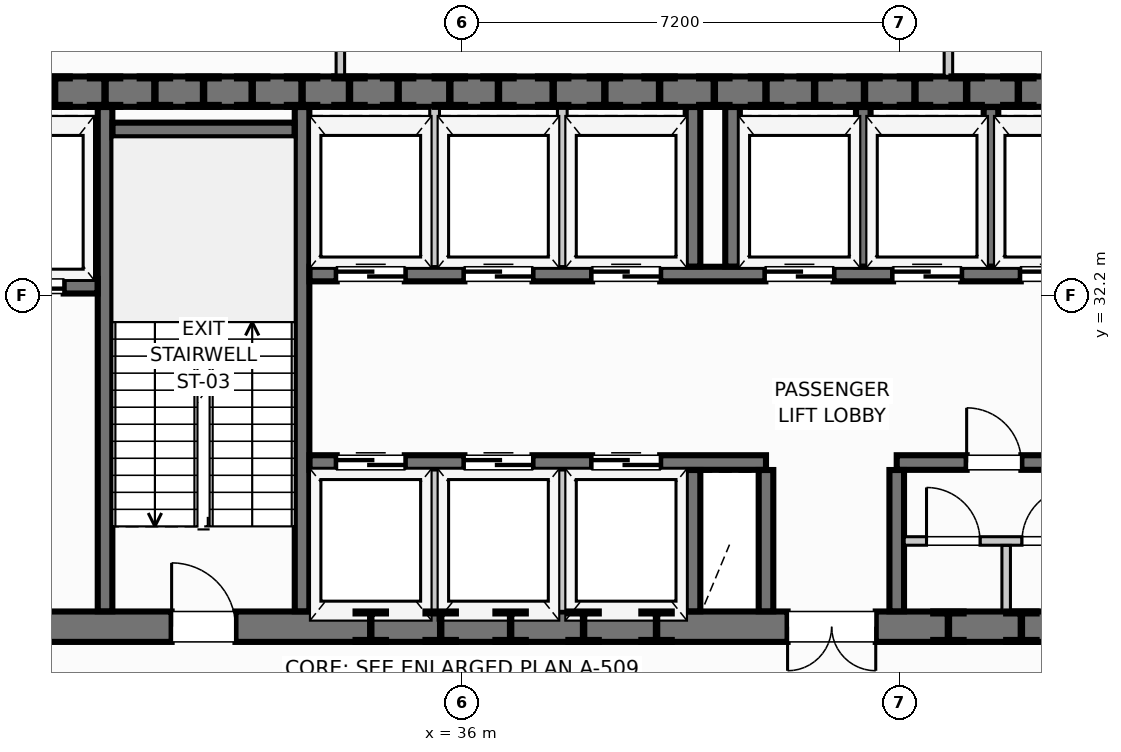
"""IFC4 building model, lengths in metres.
Left out: names, types, materials, properties, quantities, classifications, styles, units other than length and angle.
Written with IfcOpenShell. Run it as: python <this file> out.ifc"""

import sys

from ifc_helpers import new_model, si_unit, direction, frame, frame_2d, origin, origin_2d, place, context, subcontext, project, spatial, rectangle, i_section, extrude, element, fill, save


model = new_model("IFC4")
c1 = context("Model", 3, precision=1e-05, world=origin(), true_north=direction((0.0, 1.0)))
c2 = subcontext(c1, "Body", "Model", "MODEL_VIEW")
j1 = project(units=[si_unit("LENGTHUNIT", "METRE"), si_unit("PLANEANGLEUNIT", "RADIAN")], contexts=[c1])
p1 = place(None, origin())
s1 = spatial("IfcSite", under=j1, at=p1, CompositionType="ELEMENT")
p2 = place(p1, origin())
s2 = spatial("IfcBuilding", under=s1, at=p2, CompositionType="ELEMENT")
p3 = place(p2, frame((0.0, 0.0, 105.95)))
s3 = spatial("IfcBuildingStorey", under=s2, at=p3, CompositionType="ELEMENT", Elevation=105.95)
for number, where, z_axis, x_axis in (
    (1, (30.13, 35.55, 0.0), (0.0, 0.0, 1.0), (1.0, 0.0, 0.0)),
    (2, (31.75, 35.55, 0.0), (0.0, 0.0, 1.0), (1.0, 0.0, 0.0)),
    (3, (33.37, 35.55, 0.0), (0.0, 0.0, 1.0), (1.0, 0.0, 0.0)),
    (4, (34.95, 35.55, 0.0), (0.0, 0.0, 1.0), (1.0, 0.0, 0.0)),
    (5, (36.6, 35.55, 0.0), (0.0, 0.0, 1.0), (1.0, 0.0, 0.0)),
    (6, (38.35, 35.55, 0.0), (0.0, 0.0, 1.0), (1.0, 0.0, 0.0)),
    (7, (40.15, 35.55, 0.0), (0.0, 0.0, 1.0), (1.0, 0.0, 0.0)),
    (8, (41.8, 35.55, 0.0), (0.0, 0.0, 1.0), (1.0, 0.0, 0.0)),
    (9, (43.45, 35.55, 0.0), (0.0, 0.0, 1.0), (1.0, 0.0, 0.0)),
    (10, (45.15, 35.55, 0.0), (0.0, 0.0, 1.0), (1.0, 0.0, 0.0)),
    (11, (34.5, 26.75, 0.0), (0.0, 0.0, 1.0), (1.0, 0.0, 0.0)),
    (12, (36.8, 26.75, 0.0), (0.0, 0.0, 1.0), (1.0, 0.0, 0.0)),
    (13, (39.2, 26.75, 0.0), (0.0, 0.0, 1.0), (1.0, 0.0, 0.0)),
    (14, (45.2, 26.75, 0.0), (0.0, 0.0, 1.0), (1.0, 0.0, 0.0)),
    (15, (32.55, 35.55, 0.0), (0.0, 0.0, 1.0), (1.0, 0.0, 0.0)),
    (16, (37.5, 35.55, 0.0), (0.0, 0.0, 1.0), (1.0, 0.0, 0.0)),
    (17, (42.62, 35.55, 0.0), (0.0, 0.0, 1.0), (1.0, 0.0, 0.0)),
    (18, (29.3, 35.55, 0.0), (0.0, 0.0, 1.0), (1.0, 0.0, 0.0)),
    (19, (30.95, 35.55, 0.0), (0.0, 0.0, 1.0), (1.0, 0.0, 0.0)),
    (20, (34.15, 35.55, 0.0), (0.0, 0.0, 1.0), (1.0, 0.0, 0.0)),
    (21, (35.8, 35.55, 0.0), (0.0, 0.0, 1.0), (1.0, 0.0, 0.0)),
    (22, (39.25, 35.55, 0.0), (0.0, 0.0, 1.0), (1.0, 0.0, 0.0)),
    (23, (41.0, 35.55, 0.0), (0.0, 0.0, 1.0), (1.0, 0.0, 0.0)),
    (24, (44.3, 35.55, 0.0), (0.0, 0.0, 1.0), (1.0, 0.0, 0.0)),
    (25, (35.65, 26.75, 0.0), (0.0, 0.0, 1.0), (1.0, 0.0, 0.0)),
    (26, (38.0, 26.75, 0.0), (0.0, 0.0, 1.0), (1.0, 0.0, 0.0)),
    (27, (44.0, 26.75, 0.0), (0.0, 0.0, 1.0), (1.0, 0.0, 0.0)),
):
    element("IfcColumn", number, at=place(p3, frame(where, z_axis=z_axis, x_axis=x_axis)), inside=s3, PredefinedType="COLUMN", context=c2, shape_type="SweptSolid", body=[
        extrude(i_section(OverallWidth=0.5, OverallDepth=0.5, WebThickness=0.022, FlangeThickness=0.032, at=origin_2d()), origin(), (0.0, 0.0, 1.0), 4.5),
    ])
p4 = place(p3, frame((21.65, 26.75, 0.0), z_axis=(0.0, 0.0, 1.0), x_axis=(1.0, 0.0, 0.0)))
e28 = element("IfcWall", 28, at=p4, inside=s3, PredefinedType="SHEAR", context=c2, shape_type="SweptSolid", body=[
    extrude(rectangle(XDim=28.7, YDim=0.5, at=frame_2d((14.35, 0.0))), origin(), (0.0, 0.0, 1.0), 4.5),
])
p5 = place(p4, frame((1.375, 0.0, 0.0)))
e29 = element("IfcOpeningElement", 29, at=p5, cuts=e28, PredefinedType="OPENING", context=c2, shape_type="SweptSolid", body=[
    extrude(rectangle(XDim=1.05, YDim=2.0, at=frame_2d((0.525, 1.0))), frame((0.0, 0.26, 0.0), z_axis=(0.0, -1.0, 0.0), x_axis=(1.0, 0.0, 0.0)), (0.0, 0.0, 1.0), 0.52),
])
p6 = place(p4, frame((5.375, 0.0, 0.0)))
e30 = element("IfcOpeningElement", 30, at=p6, cuts=e28, PredefinedType="OPENING", context=c2, shape_type="SweptSolid", body=[
    extrude(rectangle(XDim=1.05, YDim=2.0, at=frame_2d((0.525, 1.0))), frame((0.0, 0.26, 0.0), z_axis=(0.0, -1.0, 0.0), x_axis=(1.0, 0.0, 0.0)), (0.0, 0.0, 1.0), 0.52),
])
p7 = place(p4, frame((9.575, 0.0, 0.0)))
e31 = element("IfcOpeningElement", 31, at=p7, cuts=e28, PredefinedType="OPENING", context=c2, shape_type="SweptSolid", body=[
    extrude(rectangle(XDim=1.05, YDim=2.0, at=frame_2d((0.525, 1.0))), frame((0.0, 0.26, 0.0), z_axis=(0.0, -1.0, 0.0), x_axis=(1.0, 0.0, 0.0)), (0.0, 0.0, 1.0), 0.52),
])
p8 = place(p4, frame((19.705, 0.0, 0.0)))
e32 = element("IfcOpeningElement", 32, at=p8, cuts=e28, PredefinedType="OPENING", context=c2, shape_type="SweptSolid", body=[
    extrude(rectangle(XDim=1.45, YDim=2.0, at=frame_2d((0.725, 1.0))), frame((0.0, 0.26, 0.0), z_axis=(0.0, -1.0, 0.0), x_axis=(1.0, 0.0, 0.0)), (0.0, 0.0, 1.0), 0.52),
])
p9 = place(p4, frame((26.275, 0.0, 0.0)))
e33 = element("IfcOpeningElement", 33, at=p9, cuts=e28, PredefinedType="OPENING", context=c2, shape_type="SweptSolid", body=[
    extrude(rectangle(XDim=1.05, YDim=2.0, at=frame_2d((0.525, 1.0))), frame((0.0, 0.26, 0.0), z_axis=(0.0, -1.0, 0.0), x_axis=(1.0, 0.0, 0.0)), (0.0, 0.0, 1.0), 0.52),
])
p10 = place(p3, frame((50.35, 35.55, 0.0), z_axis=(0.0, 0.0, 1.0), x_axis=(-1.0, 0.0, 0.0)))
e34 = element("IfcWall", 34, at=p10, inside=s3, PredefinedType="SHEAR", context=c2, shape_type="SweptSolid", body=[
    extrude(rectangle(XDim=28.7, YDim=0.5, at=frame_2d((14.35, 0.0))), origin(), (0.0, 0.0, 1.0), 4.5),
])
for number, where, z_axis, x_axis in (
    (35, (30.13, 27.003, 0.0), (0.0, 0.0, 1.0), (0.0, 1.0, 0.0)),
    (36, (33.37, 27.003, 0.0), (0.0, 0.0, 1.0), (0.0, 1.0, 0.0)),
):
    element("IfcWall", number, at=place(p3, frame(where, z_axis=z_axis, x_axis=x_axis)), inside=s3, PredefinedType="SHEAR", context=c2, shape_type="SweptSolid", body=[
        extrude(rectangle(XDim=8.294, YDim=0.24, at=frame_2d((4.147, 0.0))), origin(), (0.0, 0.0, 1.0), 4.5),
    ])
p11 = place(p3, frame((30.253, 34.92, 0.0), z_axis=(0.0, 0.0, 1.0), x_axis=(1.0, 0.0, 0.0)))
e37 = element("IfcWall", 37, at=p11, inside=s3, PredefinedType="SHEAR", context=c2, shape_type="SweptSolid", body=[
    extrude(rectangle(XDim=2.994, YDim=0.24, at=frame_2d((1.497, 0.0))), origin(), (0.0, 0.0, 1.0), 4.5),
])
p12 = place(p3, frame((25.293, 32.35, 0.0), z_axis=(0.0, 0.0, 1.0), x_axis=(1.0, 0.0, 0.0)))
e38 = element("IfcWall", 38, at=p12, inside=s3, PredefinedType="SHEAR", context=c2, shape_type="SweptSolid", body=[
    extrude(rectangle(XDim=4.714, YDim=0.24, at=frame_2d((2.357, 0.0))), origin(), (0.0, 0.0, 1.0), 4.5),
])
p13 = place(p12, frame((0.707, 0.0, 0.0)))
e39 = element("IfcOpeningElement", 39, at=p13, cuts=e38, PredefinedType="OPENING", context=c2, shape_type="SweptSolid", body=[
    extrude(rectangle(XDim=1.1, YDim=2.0, at=frame_2d((0.55, 1.0))), frame((0.0, 0.13, 0.0), z_axis=(0.0, -1.0, 0.0), x_axis=(1.0, 0.0, 0.0)), (0.0, 0.0, 1.0), 0.26),
])
p14 = place(p12, frame((3.057, 0.0, 0.0)))
e40 = element("IfcOpeningElement", 40, at=p14, cuts=e38, PredefinedType="OPENING", context=c2, shape_type="SweptSolid", body=[
    extrude(rectangle(XDim=1.1, YDim=2.0, at=frame_2d((0.55, 1.0))), frame((0.0, 0.13, 0.0), z_axis=(0.0, -1.0, 0.0), x_axis=(1.0, 0.0, 0.0)), (0.0, 0.0, 1.0), 0.26),
])
p15 = place(p3, frame((33.493, 32.55, 0.0), z_axis=(0.0, 0.0, 1.0), x_axis=(1.0, 0.0, 0.0)))
e41 = element("IfcWall", 41, at=p15, inside=s3, PredefinedType="SHEAR", context=c2, shape_type="SweptSolid", body=[
    extrude(rectangle(XDim=13.214, YDim=0.24, at=frame_2d((6.607, 0.0))), origin(), (0.0, 0.0, 1.0), 4.5),
])
p16 = place(p15, frame((0.447, 0.0, 0.0)))
e42 = element("IfcOpeningElement", 42, at=p16, cuts=e41, PredefinedType="OPENING", context=c2, shape_type="SweptSolid", body=[
    extrude(rectangle(XDim=1.12, YDim=2.0, at=frame_2d((0.56, 1.0))), frame((0.0, 0.13, 0.0), z_axis=(0.0, -1.0, 0.0), x_axis=(1.0, 0.0, 0.0)), (0.0, 0.0, 1.0), 0.26),
])
p17 = place(p15, frame((2.547, 0.0, 0.0)))
e43 = element("IfcOpeningElement", 43, at=p17, cuts=e41, PredefinedType="OPENING", context=c2, shape_type="SweptSolid", body=[
    extrude(rectangle(XDim=1.12, YDim=2.0, at=frame_2d((0.56, 1.0))), frame((0.0, 0.13, 0.0), z_axis=(0.0, -1.0, 0.0), x_axis=(1.0, 0.0, 0.0)), (0.0, 0.0, 1.0), 0.26),
])
p18 = place(p15, frame((4.647, 0.0, 0.0)))
e44 = element("IfcOpeningElement", 44, at=p18, cuts=e41, PredefinedType="OPENING", context=c2, shape_type="SweptSolid", body=[
    extrude(rectangle(XDim=1.12, YDim=2.0, at=frame_2d((0.56, 1.0))), frame((0.0, 0.13, 0.0), z_axis=(0.0, -1.0, 0.0), x_axis=(1.0, 0.0, 0.0)), (0.0, 0.0, 1.0), 0.26),
])
p19 = place(p15, frame((7.497, 0.0, 0.0)))
e45 = element("IfcOpeningElement", 45, at=p19, cuts=e41, PredefinedType="OPENING", context=c2, shape_type="SweptSolid", body=[
    extrude(rectangle(XDim=1.12, YDim=2.0, at=frame_2d((0.56, 1.0))), frame((0.0, 0.13, 0.0), z_axis=(0.0, -1.0, 0.0), x_axis=(1.0, 0.0, 0.0)), (0.0, 0.0, 1.0), 0.26),
])
p20 = place(p15, frame((9.597, 0.0, 0.0)))
e46 = element("IfcOpeningElement", 46, at=p20, cuts=e41, PredefinedType="OPENING", context=c2, shape_type="SweptSolid", body=[
    extrude(rectangle(XDim=1.12, YDim=2.0, at=frame_2d((0.56, 1.0))), frame((0.0, 0.13, 0.0), z_axis=(0.0, -1.0, 0.0), x_axis=(1.0, 0.0, 0.0)), (0.0, 0.0, 1.0), 0.26),
])
p21 = place(p15, frame((11.697, 0.0, 0.0)))
e47 = element("IfcOpeningElement", 47, at=p21, cuts=e41, PredefinedType="OPENING", context=c2, shape_type="SweptSolid", body=[
    extrude(rectangle(XDim=1.12, YDim=2.0, at=frame_2d((0.56, 1.0))), frame((0.0, 0.13, 0.0), z_axis=(0.0, -1.0, 0.0), x_axis=(1.0, 0.0, 0.0)), (0.0, 0.0, 1.0), 0.26),
])
p22 = place(p3, frame((33.493, 29.45, 0.0), z_axis=(0.0, 0.0, 1.0), x_axis=(1.0, 0.0, 0.0)))
e48 = element("IfcWall", 48, at=p22, inside=s3, PredefinedType="SHEAR", context=c2, shape_type="SweptSolid", body=[
    extrude(rectangle(XDim=7.507, YDim=0.24, at=frame_2d((3.753, 0.0))), origin(), (0.0, 0.0, 1.0), 4.5),
])
p23 = place(p22, frame((0.447, 0.0, 0.0)))
e49 = element("IfcOpeningElement", 49, at=p23, cuts=e48, PredefinedType="OPENING", context=c2, shape_type="SweptSolid", body=[
    extrude(rectangle(XDim=1.12, YDim=2.0, at=frame_2d((0.56, 1.0))), frame((0.0, 0.13, 0.0), z_axis=(0.0, -1.0, 0.0), x_axis=(1.0, 0.0, 0.0)), (0.0, 0.0, 1.0), 0.26),
])
p24 = place(p22, frame((2.547, 0.0, 0.0)))
e50 = element("IfcOpeningElement", 50, at=p24, cuts=e48, PredefinedType="OPENING", context=c2, shape_type="SweptSolid", body=[
    extrude(rectangle(XDim=1.12, YDim=2.0, at=frame_2d((0.56, 1.0))), frame((0.0, 0.13, 0.0), z_axis=(0.0, -1.0, 0.0), x_axis=(1.0, 0.0, 0.0)), (0.0, 0.0, 1.0), 0.26),
])
p25 = place(p22, frame((4.647, 0.0, 0.0)))
e51 = element("IfcOpeningElement", 51, at=p25, cuts=e48, PredefinedType="OPENING", context=c2, shape_type="SweptSolid", body=[
    extrude(rectangle(XDim=1.12, YDim=2.0, at=frame_2d((0.56, 1.0))), frame((0.0, 0.13, 0.0), z_axis=(0.0, -1.0, 0.0), x_axis=(1.0, 0.0, 0.0)), (0.0, 0.0, 1.0), 0.26),
])
p26 = place(p3, frame((43.15, 29.45, 0.0), z_axis=(0.0, 0.0, 1.0), x_axis=(1.0, 0.0, 0.0)))
e52 = element("IfcWall", 52, at=p26, inside=s3, PredefinedType="SHEAR", context=c2, shape_type="SweptSolid", body=[
    extrude(rectangle(XDim=3.557, YDim=0.24, at=frame_2d((1.779, 0.0))), origin(), (0.0, 0.0, 1.0), 4.5),
])
p27 = place(p26, frame((1.15, 0.0, 0.0)))
e53 = element("IfcOpeningElement", 53, at=p27, cuts=e52, PredefinedType="OPENING", context=c2, shape_type="SweptSolid", body=[
    extrude(rectangle(XDim=0.9, YDim=2.0, at=frame_2d((0.45, 1.0))), frame((0.0, 0.13, 0.0), z_axis=(0.0, -1.0, 0.0), x_axis=(1.0, 0.0, 0.0)), (0.0, 0.0, 1.0), 0.26),
])
for number, where, z_axis, x_axis in (
    (54, (41.0, 27.003, 0.0), (0.0, 0.0, 1.0), (0.0, 1.0, 0.0)),
    (55, (43.15, 27.003, 0.0), (0.0, 0.0, 1.0), (0.0, 1.0, 0.0)),
):
    element("IfcWall", number, at=place(p3, frame(where, z_axis=z_axis, x_axis=x_axis)), inside=s3, PredefinedType="SHEAR", context=c2, shape_type="SweptSolid", body=[
        extrude(rectangle(XDim=2.324, YDim=0.24, at=frame_2d((1.162, 0.0))), origin(), (0.0, 0.0, 1.0), 4.5),
    ])
for number, where, z_axis, x_axis in (
    (56, (39.8, 32.673, 0.0), (0.0, 0.0, 1.0), (0.0, 1.0, 0.0)),
    (57, (40.45, 32.673, 0.0), (0.0, 0.0, 1.0), (0.0, 1.0, 0.0)),
    (58, (42.6, 32.673, 0.0), (0.0, 0.0, 1.0), (0.0, 1.0, 0.0)),
    (59, (44.7, 32.673, 0.0), (0.0, 0.0, 1.0), (0.0, 1.0, 0.0)),
):
    element("IfcWall", number, at=place(p3, frame(where, z_axis=z_axis, x_axis=x_axis)), inside=s3, PredefinedType="SHEAR", context=c2, shape_type="SweptSolid", body=[
        extrude(rectangle(XDim=2.624, YDim=0.24, at=frame_2d((1.312, 0.0))), origin(), (0.0, 0.0, 1.0), 4.5),
    ])
p28 = place(p3, frame((39.8, 27.003, 0.0), z_axis=(0.0, 0.0, 1.0), x_axis=(0.0, 1.0, 0.0)))
e60 = element("IfcWall", 60, at=p28, inside=s3, PredefinedType="SHEAR", context=c2, shape_type="SweptSolid", body=[
    extrude(rectangle(XDim=2.324, YDim=0.24, at=frame_2d((1.162, 0.0))), origin(), (0.0, 0.0, 1.0), 4.5),
])
for number, where, z_axis, x_axis in (
    (61, (35.55, 32.673, 0.0), (0.0, 0.0, 1.0), (0.0, 1.0, 0.0)),
    (62, (37.65, 32.673, 0.0), (0.0, 0.0, 1.0), (0.0, 1.0, 0.0)),
):
    element("IfcWall", number, at=place(p3, frame(where, z_axis=z_axis, x_axis=x_axis)), inside=s3, PredefinedType="MOVABLE", context=c2, shape_type="SweptSolid", body=[
        extrude(rectangle(XDim=2.624, YDim=0.16, at=frame_2d((1.312, 0.0))), origin(), (0.0, 0.0, 1.0), 4.245),
    ])
for number, where, z_axis, x_axis in (
    (63, (35.55, 27.003, 0.0), (0.0, 0.0, 1.0), (0.0, 1.0, 0.0)),
    (64, (37.65, 27.003, 0.0), (0.0, 0.0, 1.0), (0.0, 1.0, 0.0)),
):
    element("IfcWall", number, at=place(p3, frame(where, z_axis=z_axis, x_axis=x_axis)), inside=s3, PredefinedType="MOVABLE", context=c2, shape_type="SweptSolid", body=[
        extrude(rectangle(XDim=2.324, YDim=0.16, at=frame_2d((1.162, 0.0))), origin(), (0.0, 0.0, 1.0), 4.245),
    ])
p29 = place(p3, frame((43.273, 28.16, 0.0), z_axis=(0.0, 0.0, 1.0), x_axis=(1.0, 0.0, 0.0)))
e65 = element("IfcWall", 65, at=p29, inside=s3, PredefinedType="PARTITIONING", context=c2, shape_type="SweptSolid", body=[
    extrude(rectangle(XDim=3.434, YDim=0.14, at=frame_2d((1.717, 0.0))), origin(), (0.0, 0.0, 1.0), 4.245),
])
p30 = place(p29, frame((0.367, 0.0, 0.0)))
e66 = element("IfcOpeningElement", 66, at=p30, cuts=e65, PredefinedType="OPENING", context=c2, shape_type="SweptSolid", body=[
    extrude(rectangle(XDim=0.88, YDim=2.02, at=frame_2d((0.44, 1.01))), frame((0.0, 0.08, 0.0), z_axis=(0.0, -1.0, 0.0), x_axis=(1.0, 0.0, 0.0)), (0.0, 0.0, 1.0), 0.16),
])
p31 = place(p29, frame((1.937, 0.0, 0.0)))
e67 = element("IfcOpeningElement", 67, at=p31, cuts=e65, PredefinedType="OPENING", context=c2, shape_type="SweptSolid", body=[
    extrude(rectangle(XDim=0.88, YDim=2.02, at=frame_2d((0.44, 1.01))), frame((0.0, 0.08, 0.0), z_axis=(0.0, -1.0, 0.0), x_axis=(1.0, 0.0, 0.0)), (0.0, 0.0, 1.0), 0.16),
])
p32 = place(p3, frame((44.95, 27.003, 0.0), z_axis=(0.0, 0.0, 1.0), x_axis=(0.0, 1.0, 0.0)))
e68 = element("IfcWall", 68, at=p32, inside=s3, PredefinedType="PARTITIONING", context=c2, shape_type="SweptSolid", body=[
    extrude(rectangle(XDim=1.084, YDim=0.14, at=frame_2d((0.542, 0.0))), origin(), (0.0, 0.0, 1.0), 4.245),
])
p33 = place(p3, frame((34.0, 35.803, 0.0), z_axis=(0.0, 0.0, 1.0), x_axis=(0.0, 1.0, 0.0)))
e69 = element("IfcWall", 69, at=p33, inside=s3, PredefinedType="PARTITIONING", context=c2, shape_type="SweptSolid", body=[
    extrude(rectangle(XDim=12.133, YDim=0.14, at=frame_2d((6.066, 0.0))), origin(), (0.0, 0.0, 1.0), 4.245),
])
p34 = place(p33, frame((5.626, 0.0, 0.0)))
e70 = element("IfcOpeningElement", 70, at=p34, cuts=e69, PredefinedType="OPENING", context=c2, shape_type="SweptSolid", body=[
    extrude(rectangle(XDim=0.9, YDim=2.0, at=frame_2d((0.45, 1.0))), frame((0.0, 0.08, 0.0), z_axis=(0.0, -1.0, 0.0), x_axis=(1.0, 0.0, 0.0)), (0.0, 0.0, 1.0), 0.16),
])
p35 = place(p3, frame((44.0, 35.803, 0.0), z_axis=(0.0, 0.0, 1.0), x_axis=(0.0, 1.0, 0.0)))
e71 = element("IfcWall", 71, at=p35, inside=s3, PredefinedType="PARTITIONING", context=c2, shape_type="SweptSolid", body=[
    extrude(rectangle(XDim=11.519, YDim=0.14, at=frame_2d((5.76, 0.0))), origin(), (0.0, 0.0, 1.0), 4.245),
])
p36 = place(p27, origin())
e72 = element("IfcDoor", 72, at=p36, inside=s3, OperationType="SINGLE_SWING_LEFT", PredefinedType="DOOR", context=c2, shape_type="SweptSolid", body=[
    extrude(rectangle(XDim=0.9, YDim=2.0, at=frame_2d((0.45, 1.0))), frame((0.0, 0.025, 0.0), z_axis=(0.0, -1.0, 0.0), x_axis=(1.0, 0.0, 0.0)), (0.0, 0.0, 1.0), 0.05),
])
fill(e53, e72)
p37 = place(p30, origin())
e73 = element("IfcDoor", 73, at=p37, inside=s3, OperationType="SINGLE_SWING_LEFT", PredefinedType="DOOR", context=c2, shape_type="SweptSolid", body=[
    extrude(rectangle(XDim=0.88, YDim=2.02, at=frame_2d((0.44, 1.01))), frame((0.0, 0.025, 0.0), z_axis=(0.0, -1.0, 0.0), x_axis=(1.0, 0.0, 0.0)), (0.0, 0.0, 1.0), 0.05),
])
fill(e66, e73)
p38 = place(p31, origin())
e74 = element("IfcDoor", 74, at=p38, inside=s3, OperationType="SINGLE_SWING_RIGHT", PredefinedType="DOOR", context=c2, shape_type="SweptSolid", body=[
    extrude(rectangle(XDim=0.88, YDim=2.02, at=frame_2d((0.44, 1.01))), frame((0.0, 0.025, 0.0), z_axis=(0.0, -1.0, 0.0), x_axis=(1.0, 0.0, 0.0)), (0.0, 0.0, 1.0), 0.05),
])
fill(e67, e74)
p39 = place(p7, origin())
e75 = element("IfcDoor", 75, at=p39, inside=s3, OperationType="SINGLE_SWING_LEFT", PredefinedType="DOOR", context=c2, shape_type="SweptSolid", body=[
    extrude(rectangle(XDim=1.05, YDim=2.0, at=frame_2d((0.525, 1.0))), frame((0.0, 0.025, 0.0), z_axis=(0.0, -1.0, 0.0), x_axis=(1.0, 0.0, 0.0)), (0.0, 0.0, 1.0), 0.05),
])
fill(e31, e75)
p40 = place(p8, frame((1.45, 0.0, 0.0), z_axis=(0.0, 0.0, 1.0), x_axis=(-1.0, 0.0, 0.0)))
e76 = element("IfcDoor", 76, at=p40, inside=s3, OperationType="DOUBLE_DOOR_SINGLE_SWING", PredefinedType="DOOR", context=c2, shape_type="SweptSolid", body=[
    extrude(rectangle(XDim=1.45, YDim=2.0, at=frame_2d((0.725, 1.0))), frame((0.0, 0.025, 0.0), z_axis=(0.0, -1.0, 0.0), x_axis=(1.0, 0.0, 0.0)), (0.0, 0.0, 1.0), 0.05),
])
fill(e32, e76)
p41 = place(p14, origin())
e77 = element("IfcDoor", 77, at=p41, inside=s3, OperationType="DOUBLE_DOOR_SLIDING", PredefinedType="USERDEFINED", context=c2, shape_type="SweptSolid", body=[
    extrude(rectangle(XDim=1.1, YDim=2.0, at=frame_2d((0.55, 1.0))), frame((0.0, 0.025, 0.0), z_axis=(0.0, -1.0, 0.0), x_axis=(1.0, 0.0, 0.0)), (0.0, 0.0, 1.0), 0.05),
])
fill(e40, e77)
p42 = place(p16, origin())
e78 = element("IfcDoor", 78, at=p42, inside=s3, OperationType="DOUBLE_DOOR_SLIDING", PredefinedType="USERDEFINED", context=c2, shape_type="SweptSolid", body=[
    extrude(rectangle(XDim=1.12, YDim=2.0, at=frame_2d((0.56, 1.0))), frame((0.0, 0.025, 0.0), z_axis=(0.0, -1.0, 0.0), x_axis=(1.0, 0.0, 0.0)), (0.0, 0.0, 1.0), 0.05),
])
fill(e42, e78)
p43 = place(p17, origin())
e79 = element("IfcDoor", 79, at=p43, inside=s3, OperationType="DOUBLE_DOOR_SLIDING", PredefinedType="USERDEFINED", context=c2, shape_type="SweptSolid", body=[
    extrude(rectangle(XDim=1.12, YDim=2.0, at=frame_2d((0.56, 1.0))), frame((0.0, 0.025, 0.0), z_axis=(0.0, -1.0, 0.0), x_axis=(1.0, 0.0, 0.0)), (0.0, 0.0, 1.0), 0.05),
])
fill(e43, e79)
p44 = place(p18, origin())
e80 = element("IfcDoor", 80, at=p44, inside=s3, OperationType="DOUBLE_DOOR_SLIDING", PredefinedType="USERDEFINED", context=c2, shape_type="SweptSolid", body=[
    extrude(rectangle(XDim=1.12, YDim=2.0, at=frame_2d((0.56, 1.0))), frame((0.0, 0.025, 0.0), z_axis=(0.0, -1.0, 0.0), x_axis=(1.0, 0.0, 0.0)), (0.0, 0.0, 1.0), 0.05),
])
fill(e44, e80)
p45 = place(p23, origin())
e81 = element("IfcDoor", 81, at=p45, inside=s3, OperationType="DOUBLE_DOOR_SLIDING", PredefinedType="USERDEFINED", context=c2, shape_type="SweptSolid", body=[
    extrude(rectangle(XDim=1.12, YDim=2.0, at=frame_2d((0.56, 1.0))), frame((0.0, 0.025, 0.0), z_axis=(0.0, -1.0, 0.0), x_axis=(1.0, 0.0, 0.0)), (0.0, 0.0, 1.0), 0.05),
])
fill(e49, e81)
p46 = place(p24, origin())
e82 = element("IfcDoor", 82, at=p46, inside=s3, OperationType="DOUBLE_DOOR_SLIDING", PredefinedType="USERDEFINED", context=c2, shape_type="SweptSolid", body=[
    extrude(rectangle(XDim=1.12, YDim=2.0, at=frame_2d((0.56, 1.0))), frame((0.0, 0.025, 0.0), z_axis=(0.0, -1.0, 0.0), x_axis=(1.0, 0.0, 0.0)), (0.0, 0.0, 1.0), 0.05),
])
fill(e50, e82)
p47 = place(p25, origin())
e83 = element("IfcDoor", 83, at=p47, inside=s3, OperationType="DOUBLE_DOOR_SLIDING", PredefinedType="USERDEFINED", context=c2, shape_type="SweptSolid", body=[
    extrude(rectangle(XDim=1.12, YDim=2.0, at=frame_2d((0.56, 1.0))), frame((0.0, 0.025, 0.0), z_axis=(0.0, -1.0, 0.0), x_axis=(1.0, 0.0, 0.0)), (0.0, 0.0, 1.0), 0.05),
])
fill(e51, e83)
p48 = place(p19, origin())
e84 = element("IfcDoor", 84, at=p48, inside=s3, OperationType="DOUBLE_DOOR_SLIDING", PredefinedType="USERDEFINED", context=c2, shape_type="SweptSolid", body=[
    extrude(rectangle(XDim=1.12, YDim=2.0, at=frame_2d((0.56, 1.0))), frame((0.0, 0.025, 0.0), z_axis=(0.0, -1.0, 0.0), x_axis=(1.0, 0.0, 0.0)), (0.0, 0.0, 1.0), 0.05),
])
fill(e45, e84)
p49 = place(p20, origin())
e85 = element("IfcDoor", 85, at=p49, inside=s3, OperationType="DOUBLE_DOOR_SLIDING", PredefinedType="USERDEFINED", context=c2, shape_type="SweptSolid", body=[
    extrude(rectangle(XDim=1.12, YDim=2.0, at=frame_2d((0.56, 1.0))), frame((0.0, 0.025, 0.0), z_axis=(0.0, -1.0, 0.0), x_axis=(1.0, 0.0, 0.0)), (0.0, 0.0, 1.0), 0.05),
])
fill(e46, e85)
p50 = place(p21, origin())
e86 = element("IfcDoor", 86, at=p50, inside=s3, OperationType="DOUBLE_DOOR_SLIDING", PredefinedType="USERDEFINED", context=c2, shape_type="SweptSolid", body=[
    extrude(rectangle(XDim=1.12, YDim=2.0, at=frame_2d((0.56, 1.0))), frame((0.0, 0.025, 0.0), z_axis=(0.0, -1.0, 0.0), x_axis=(1.0, 0.0, 0.0)), (0.0, 0.0, 1.0), 0.05),
])
fill(e47, e86)
save(model, sys.argv[1])
